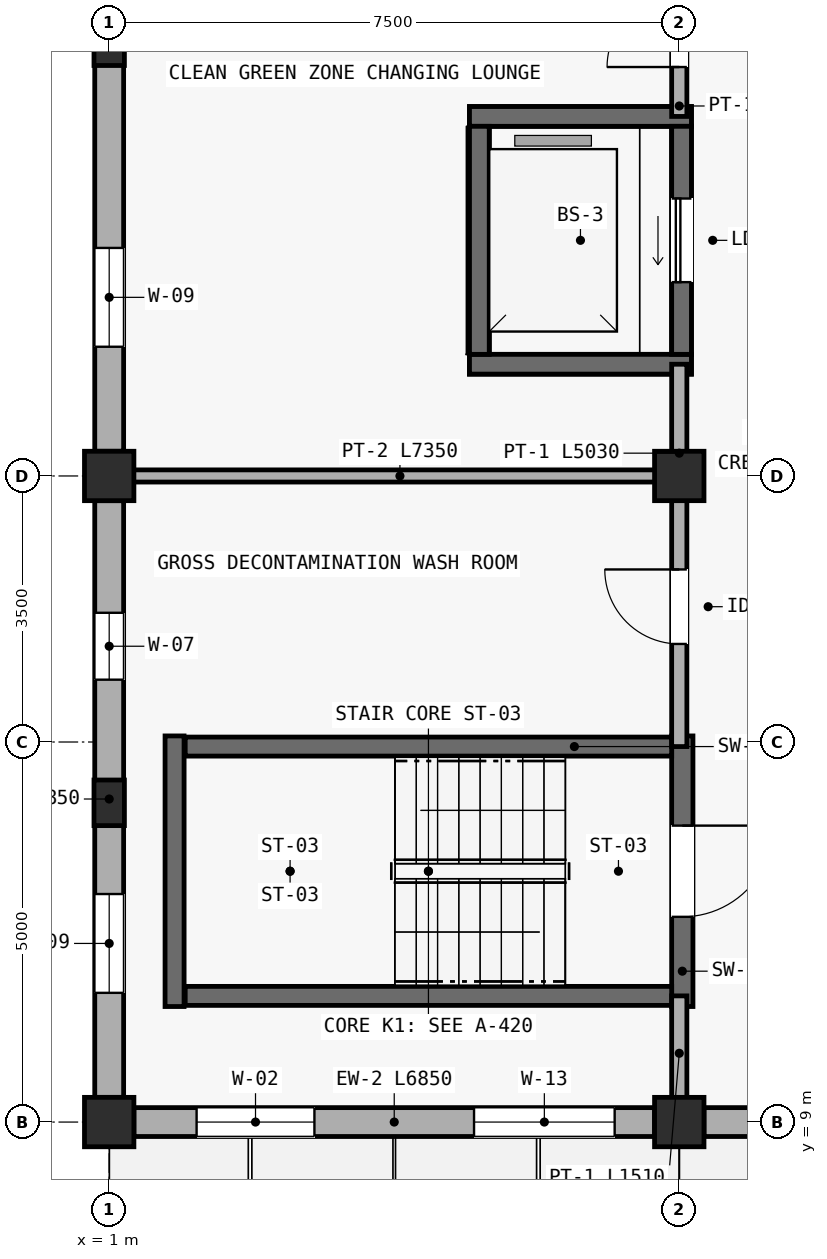
"""IFC4 building model, lengths in metres.
Left out: names, types, materials, properties, quantities, classifications, styles, units other than length and angle.
Written with IfcOpenShell. Run it as: python <this file> out.ifc"""

import sys

from ifc_helpers import new_model, si_unit, direction, frame, frame_2d, origin, origin_2d, place, context, subcontext, project, spatial, rectangle, extrude, element, fill, save


model = new_model("IFC4")
c1 = context("Model", 3, precision=1e-05, world=origin(), true_north=direction((0.0, 1.0)))
c2 = subcontext(c1, "Body", "Model", "MODEL_VIEW")
j1 = project(units=[si_unit("LENGTHUNIT", "METRE"), si_unit("PLANEANGLEUNIT", "RADIAN")], contexts=[c1])
p1 = place(None, origin())
s1 = spatial("IfcSite", under=j1, at=p1, CompositionType="ELEMENT")
p2 = place(p1, origin())
s2 = spatial("IfcBuilding", under=s1, at=p2, CompositionType="ELEMENT")
p3 = place(p2, origin())
s3 = spatial("IfcBuildingStorey", under=s2, at=p3, CompositionType="ELEMENT", Elevation=0.0)
for number, where, z_axis, x_axis in (
    (1, (1.0, 9.0, 0.0), (0.0, 0.0, 1.0), (1.0, 0.0, 0.0)),
    (2, (1.0, 17.5, 0.0), (0.0, 0.0, 1.0), (1.0, 0.0, 0.0)),
    (3, (8.5, 9.0, 0.0), (0.0, 0.0, 1.0), (1.0, 0.0, 0.0)),
    (4, (8.5, 17.5, 0.0), (0.0, 0.0, 1.0), (1.0, 0.0, 0.0)),
):
    element("IfcColumn", number, at=place(p3, frame(where, z_axis=z_axis, x_axis=x_axis)), inside=s3, PredefinedType="COLUMN", context=c2, shape_type="SweptSolid", body=[
        extrude(rectangle(XDim=0.65, YDim=0.65, at=origin_2d()), origin(), (0.0, 0.0, 1.0), 5.85),
    ])
for number, where, z_axis, x_axis in (
    (5, (1.0, 13.2, 0.0), (0.0, 0.0, 1.0), (1.0, 0.0, 0.0)),
    (6, (1.0, 23.2, 0.0), (0.0, 0.0, 1.0), (1.0, 0.0, 0.0)),
):
    element("IfcColumn", number, at=place(p3, frame(where, z_axis=z_axis, x_axis=x_axis)), inside=s3, PredefinedType="PILASTER", context=c2, shape_type="SweptSolid", body=[
        extrude(rectangle(XDim=0.4, YDim=0.6, at=origin_2d()), origin(), (0.0, 0.0, 1.0), 5.85),
    ])
p4 = place(p3, frame((1.325, 9.0, 0.0), z_axis=(0.0, 0.0, 1.0), x_axis=(1.0, 0.0, 0.0)))
e7 = element("IfcWall", 7, at=p4, inside=s3, PredefinedType="STANDARD", context=c2, shape_type="SweptSolid", body=[
    extrude(rectangle(XDim=6.85, YDim=0.38, at=frame_2d((3.425, 0.0))), origin(), (0.0, 0.0, 1.0), 5.05),
])
p5 = place(p4, frame((0.825, 0.0, 0.75)))
e8 = element("IfcOpeningElement", 8, at=p5, cuts=e7, PredefinedType="OPENING", context=c2, shape_type="SweptSolid", body=[
    extrude(rectangle(XDim=1.55, YDim=1.55, at=frame_2d((0.775, 0.775))), frame((0.0, 0.2, 0.0), z_axis=(0.0, -1.0, 0.0), x_axis=(1.0, 0.0, 0.0)), (0.0, 0.0, 1.0), 0.4),
])
p6 = place(p4, frame((4.475, 0.0, 0.75)))
e9 = element("IfcOpeningElement", 9, at=p6, cuts=e7, PredefinedType="OPENING", context=c2, shape_type="SweptSolid", body=[
    extrude(rectangle(XDim=1.85, YDim=1.3, at=frame_2d((0.925, 0.65))), frame((0.0, 0.2, 0.0), z_axis=(0.0, -1.0, 0.0), x_axis=(1.0, 0.0, 0.0)), (0.0, 0.0, 1.0), 0.4),
])
p7 = place(p3, frame((8.825, 9.0, 0.0), z_axis=(0.0, 0.0, 1.0), x_axis=(1.0, 0.0, 0.0)))
e10 = element("IfcWall", 10, at=p7, inside=s3, PredefinedType="STANDARD", context=c2, shape_type="SweptSolid", body=[
    extrude(rectangle(XDim=3.35, YDim=0.38, at=frame_2d((1.675, 0.0))), origin(), (0.0, 0.0, 1.0), 5.05),
])
p8 = place(p7, frame((0.625, 0.0, 0.0)))
e11 = element("IfcOpeningElement", 11, at=p8, cuts=e10, PredefinedType="OPENING", context=c2, shape_type="SweptSolid", body=[
    extrude(rectangle(XDim=1.95, YDim=2.3, at=frame_2d((0.975, 1.15))), frame((0.0, 0.2, 0.0), z_axis=(0.0, -1.0, 0.0), x_axis=(1.0, 0.0, 0.0)), (0.0, 0.0, 1.0), 0.4),
])
p9 = place(p3, frame((1.0, 17.175, 0.0), z_axis=(0.0, 0.0, 1.0), x_axis=(0.0, -1.0, 0.0)))
e12 = element("IfcWall", 12, at=p9, inside=s3, PredefinedType="STANDARD", context=c2, shape_type="SweptSolid", body=[
    extrude(rectangle(XDim=7.85, YDim=0.38, at=frame_2d((3.925, 0.0))), origin(), (0.0, 0.0, 1.0), 5.05),
])
p10 = place(p9, frame((1.475, 0.0, 0.7)))
e13 = element("IfcOpeningElement", 13, at=p10, cuts=e12, PredefinedType="OPENING", context=c2, shape_type="SweptSolid", body=[
    extrude(rectangle(XDim=0.88, YDim=1.5, at=frame_2d((0.44, 0.75))), frame((0.0, 0.2, 0.0), z_axis=(0.0, -1.0, 0.0), x_axis=(1.0, 0.0, 0.0)), (0.0, 0.0, 1.0), 0.4),
])
p11 = place(p9, frame((5.175, 0.0, 0.7)))
e14 = element("IfcOpeningElement", 14, at=p11, cuts=e12, PredefinedType="OPENING", context=c2, shape_type="SweptSolid", body=[
    extrude(rectangle(XDim=1.3, YDim=1.4, at=frame_2d((0.65, 0.7))), frame((0.0, 0.2, 0.0), z_axis=(0.0, -1.0, 0.0), x_axis=(1.0, 0.0, 0.0)), (0.0, 0.0, 1.0), 0.4),
])
p12 = place(p3, frame((1.0, 28.675, 0.0), z_axis=(0.0, 0.0, 1.0), x_axis=(0.0, -1.0, 0.0)))
e15 = element("IfcWall", 15, at=p12, inside=s3, PredefinedType="STANDARD", context=c2, shape_type="SweptSolid", body=[
    extrude(rectangle(XDim=10.85, YDim=0.38, at=frame_2d((5.425, 0.0))), origin(), (0.0, 0.0, 1.0), 5.05),
])
p13 = place(p12, frame((1.475, 0.0, 0.7)))
e16 = element("IfcOpeningElement", 16, at=p13, cuts=e15, PredefinedType="OPENING", context=c2, shape_type="SweptSolid", body=[
    extrude(rectangle(XDim=0.88, YDim=1.5, at=frame_2d((0.44, 0.75))), frame((0.0, 0.2, 0.0), z_axis=(0.0, -1.0, 0.0), x_axis=(1.0, 0.0, 0.0)), (0.0, 0.0, 1.0), 0.4),
])
p14 = place(p12, frame((8.175, 0.0, 0.7)))
e17 = element("IfcOpeningElement", 17, at=p14, cuts=e15, PredefinedType="OPENING", context=c2, shape_type="SweptSolid", body=[
    extrude(rectangle(XDim=1.3, YDim=1.4, at=frame_2d((0.65, 0.7))), frame((0.0, 0.2, 0.0), z_axis=(0.0, -1.0, 0.0), x_axis=(1.0, 0.0, 0.0)), (0.0, 0.0, 1.0), 0.4),
])
p15 = place(p3, frame((8.54, 14.08, 0.0), z_axis=(0.0, 0.0, 1.0), x_axis=(0.0, -1.0, 0.0)))
e18 = element("IfcWall", 18, at=p15, inside=s3, PredefinedType="SHEAR", context=c2, shape_type="SweptSolid", body=[
    extrude(rectangle(XDim=3.56, YDim=0.28, at=frame_2d((1.78, 0.0))), origin(), (0.0, 0.0, 1.0), 5.6),
])
p16 = place(p15, frame((1.18, 0.0, 0.0)))
e19 = element("IfcOpeningElement", 19, at=p16, cuts=e18, PredefinedType="OPENING", context=c2, shape_type="SweptSolid", body=[
    extrude(rectangle(XDim=1.2, YDim=2.15, at=frame_2d((0.6, 1.075))), frame((0.0, 0.15, 0.0), z_axis=(0.0, -1.0, 0.0), x_axis=(1.0, 0.0, 0.0)), (0.0, 0.0, 1.0), 0.3),
])
p17 = place(p3, frame((1.86, 10.52, 0.0), z_axis=(0.0, 0.0, 1.0), x_axis=(0.0, 1.0, 0.0)))
e20 = element("IfcWall", 20, at=p17, inside=s3, PredefinedType="SHEAR", context=c2, shape_type="SweptSolid", body=[
    extrude(rectangle(XDim=3.56, YDim=0.25, at=frame_2d((1.78, 0.0))), origin(), (0.0, 0.0, 1.0), 5.6),
])
for number, where, z_axis, x_axis in (
    (21, (8.4, 13.94, 0.0), (0.0, 0.0, 1.0), (-1.0, 0.0, 0.0)),
    (22, (2.0, 10.66, 0.0), (0.0, 0.0, 1.0), (1.0, 0.0, 0.0)),
):
    element("IfcWall", number, at=place(p3, frame(where, z_axis=z_axis, x_axis=x_axis)), inside=s3, PredefinedType="SHEAR", context=c2, shape_type="SweptSolid", body=[
        extrude(rectangle(XDim=6.4, YDim=0.25, at=frame_2d((3.2, 0.0))), origin(), (0.0, 0.0, 1.0), 5.6),
    ])
for number, where, z_axis, x_axis in (
    (23, (5.74, 18.97, -1.15), (0.0, 0.0, 1.0), (1.0, 0.0, 0.0)),
    (24, (8.66, 22.23, -1.15), (0.0, 0.0, 1.0), (-1.0, 0.0, 0.0)),
):
    element("IfcWall", number, at=place(p3, frame(where, z_axis=z_axis, x_axis=x_axis)), inside=s3, PredefinedType="SHEAR", context=c2, shape_type="SweptSolid", body=[
        extrude(rectangle(XDim=2.92, YDim=0.26, at=frame_2d((1.46, 0.0))), origin(), (0.0, 0.0, 1.0), 1.15),
    ])
for number, where, z_axis, x_axis in (
    (25, (5.87, 22.1, -1.15), (0.0, 0.0, 1.0), (0.0, -1.0, 0.0)),
    (26, (8.53, 19.1, -1.15), (0.0, 0.0, 1.0), (0.0, 1.0, 0.0)),
):
    element("IfcWall", number, at=place(p3, frame(where, z_axis=z_axis, x_axis=x_axis)), inside=s3, PredefinedType="SHEAR", context=c2, shape_type="SweptSolid", body=[
        extrude(rectangle(XDim=3.0, YDim=0.26, at=frame_2d((1.5, 0.0))), origin(), (0.0, 0.0, 1.0), 1.15),
    ])
for number, where, z_axis, x_axis in (
    (27, (5.74, 18.97, 0.0), (0.0, 0.0, 1.0), (1.0, 0.0, 0.0)),
    (28, (8.66, 22.23, 0.0), (0.0, 0.0, 1.0), (-1.0, 0.0, 0.0)),
):
    element("IfcWall", number, at=place(p3, frame(where, z_axis=z_axis, x_axis=x_axis)), inside=s3, PredefinedType="SHEAR", context=c2, shape_type="SweptSolid", body=[
        extrude(rectangle(XDim=2.92, YDim=0.26, at=frame_2d((1.46, 0.0))), origin(), (0.0, 0.0, 1.0), 5.6),
    ])
p18 = place(p3, frame((5.87, 22.1, 0.0), z_axis=(0.0, 0.0, 1.0), x_axis=(0.0, -1.0, 0.0)))
e29 = element("IfcWall", 29, at=p18, inside=s3, PredefinedType="SHEAR", context=c2, shape_type="SweptSolid", body=[
    extrude(rectangle(XDim=3.0, YDim=0.26, at=frame_2d((1.5, 0.0))), origin(), (0.0, 0.0, 1.0), 5.6),
])
p19 = place(p3, frame((8.53, 19.1, 0.0), z_axis=(0.0, 0.0, 1.0), x_axis=(0.0, 1.0, 0.0)))
e30 = element("IfcWall", 30, at=p19, inside=s3, PredefinedType="SHEAR", context=c2, shape_type="SweptSolid", body=[
    extrude(rectangle(XDim=3.0, YDim=0.26, at=frame_2d((1.5, 0.0))), origin(), (0.0, 0.0, 1.0), 5.6),
])
p20 = place(p19, frame((0.95, 0.0, 0.0)))
e31 = element("IfcOpeningElement", 31, at=p20, cuts=e30, PredefinedType="OPENING", context=c2, shape_type="SweptSolid", body=[
    extrude(rectangle(XDim=1.1, YDim=2.15, at=frame_2d((0.55, 1.075))), frame((0.0, 0.14, 0.0), z_axis=(0.0, -1.0, 0.0), x_axis=(1.0, 0.0, 0.0)), (0.0, 0.0, 1.0), 0.28),
])
p21 = place(p3, frame((8.5, 9.15, 0.0), z_axis=(0.0, 0.0, 1.0), x_axis=(0.0, 1.0, 0.0)))
e32 = element("IfcWall", 32, at=p21, inside=s3, PredefinedType="PARTITIONING", context=c2, shape_type="SweptSolid", body=[
    extrude(rectangle(XDim=1.51, YDim=0.2, at=frame_2d((0.755, 0.0))), origin(), (0.0, 0.0, 1.0), 5.0),
])
p22 = place(p3, frame((8.5, 13.94, 0.0), z_axis=(0.0, 0.0, 1.0), x_axis=(0.0, 1.0, 0.0)))
e33 = element("IfcWall", 33, at=p22, inside=s3, PredefinedType="PARTITIONING", context=c2, shape_type="SweptSolid", body=[
    extrude(rectangle(XDim=5.03, YDim=0.2, at=frame_2d((2.515, 0.0))), origin(), (0.0, 0.0, 1.0), 5.0),
])
p23 = place(p22, frame((1.35, 0.0, 0.0)))
e34 = element("IfcOpeningElement", 34, at=p23, cuts=e33, PredefinedType="OPENING", context=c2, shape_type="SweptSolid", body=[
    extrude(rectangle(XDim=0.98, YDim=2.12, at=frame_2d((0.49, 1.06))), frame((0.0, 0.11, 0.0), z_axis=(0.0, -1.0, 0.0), x_axis=(1.0, 0.0, 0.0)), (0.0, 0.0, 1.0), 0.22),
])
p24 = place(p3, frame((8.5, 22.23, 0.0), z_axis=(0.0, 0.0, 1.0), x_axis=(0.0, 1.0, 0.0)))
e35 = element("IfcWall", 35, at=p24, inside=s3, PredefinedType="PARTITIONING", context=c2, shape_type="SweptSolid", body=[
    extrude(rectangle(XDim=2.23, YDim=0.2, at=frame_2d((1.115, 0.0))), origin(), (0.0, 0.0, 1.0), 5.0),
])
p25 = place(p24, frame((0.65, 0.0, 0.0)))
e36 = element("IfcOpeningElement", 36, at=p25, cuts=e35, PredefinedType="OPENING", context=c2, shape_type="SweptSolid", body=[
    extrude(rectangle(XDim=0.95, YDim=2.1, at=frame_2d((0.475, 1.05))), frame((0.0, 0.11, 0.0), z_axis=(0.0, -1.0, 0.0), x_axis=(1.0, 0.0, 0.0)), (0.0, 0.0, 1.0), 0.22),
])
p26 = place(p3, frame((1.15, 17.5, 0.0), z_axis=(0.0, 0.0, 1.0), x_axis=(1.0, 0.0, 0.0)))
e37 = element("IfcWall", 37, at=p26, inside=s3, PredefinedType="PARTITIONING", context=c2, shape_type="SweptSolid", body=[
    extrude(rectangle(XDim=7.35, YDim=0.16, at=frame_2d((3.675, 0.0))), origin(), (0.0, 0.0, 1.0), 5.0),
])
p27 = place(p5, origin())
e38 = element("IfcWindow", 38, at=p27, inside=s3, PartitioningType="DOUBLE_PANEL_VERTICAL", PredefinedType="WINDOW", context=c2, shape_type="SweptSolid", body=[
    extrude(rectangle(XDim=1.55, YDim=1.55, at=frame_2d((0.775, 0.775))), frame((0.0, 0.03, 0.0), z_axis=(0.0, -1.0, 0.0), x_axis=(1.0, 0.0, 0.0)), (0.0, 0.0, 1.0), 0.06),
])
fill(e8, e38)
p28 = place(p6, origin())
e39 = element("IfcWindow", 39, at=p28, inside=s3, PartitioningType="DOUBLE_PANEL_HORIZONTAL", PredefinedType="WINDOW", context=c2, shape_type="SweptSolid", body=[
    extrude(rectangle(XDim=1.85, YDim=1.3, at=frame_2d((0.925, 0.65))), frame((0.0, 0.03, 0.0), z_axis=(0.0, -1.0, 0.0), x_axis=(1.0, 0.0, 0.0)), (0.0, 0.0, 1.0), 0.06),
])
fill(e9, e39)
p29 = place(p10, origin())
e40 = element("IfcWindow", 40, at=p29, inside=s3, PartitioningType="SINGLE_PANEL", PredefinedType="WINDOW", context=c2, shape_type="SweptSolid", body=[
    extrude(rectangle(XDim=0.88, YDim=1.5, at=frame_2d((0.44, 0.75))), frame((0.0, 0.03, 0.0), z_axis=(0.0, -1.0, 0.0), x_axis=(1.0, 0.0, 0.0)), (0.0, 0.0, 1.0), 0.06),
])
fill(e13, e40)
p30 = place(p11, origin())
e41 = element("IfcWindow", 41, at=p30, inside=s3, PartitioningType="SINGLE_PANEL", PredefinedType="WINDOW", context=c2, shape_type="SweptSolid", body=[
    extrude(rectangle(XDim=1.3, YDim=1.4, at=frame_2d((0.65, 0.7))), frame((0.0, 0.03, 0.0), z_axis=(0.0, -1.0, 0.0), x_axis=(1.0, 0.0, 0.0)), (0.0, 0.0, 1.0), 0.06),
])
fill(e14, e41)
p31 = place(p14, origin())
e42 = element("IfcWindow", 42, at=p31, inside=s3, PartitioningType="SINGLE_PANEL", PredefinedType="WINDOW", context=c2, shape_type="SweptSolid", body=[
    extrude(rectangle(XDim=1.3, YDim=1.4, at=frame_2d((0.65, 0.7))), frame((0.0, 0.03, 0.0), z_axis=(0.0, -1.0, 0.0), x_axis=(1.0, 0.0, 0.0)), (0.0, 0.0, 1.0), 0.06),
])
fill(e17, e42)
p32 = place(p16, origin())
e43 = element("IfcDoor", 43, at=p32, inside=s3, OperationType="SINGLE_SWING_LEFT", PredefinedType="DOOR", context=c2, shape_type="SweptSolid", body=[
    extrude(rectangle(XDim=1.2, YDim=2.15, at=frame_2d((0.6, 1.075))), frame((0.0, 0.025, 0.0), z_axis=(0.0, -1.0, 0.0), x_axis=(1.0, 0.0, 0.0)), (0.0, 0.0, 1.0), 0.05),
])
fill(e19, e43)
p33 = place(p20, origin())
e44 = element("IfcDoor", 44, at=p33, inside=s3, OperationType="SLIDING_TO_LEFT", PredefinedType="DOOR", context=c2, shape_type="SweptSolid", body=[
    extrude(rectangle(XDim=1.1, YDim=2.15, at=frame_2d((0.55, 1.075))), frame((0.0, 0.025, 0.0), z_axis=(0.0, -1.0, 0.0), x_axis=(1.0, 0.0, 0.0)), (0.0, 0.0, 1.0), 0.05),
])
fill(e31, e44)
p34 = place(p23, origin())
e45 = element("IfcDoor", 45, at=p34, inside=s3, OperationType="SINGLE_SWING_RIGHT", PredefinedType="DOOR", context=c2, shape_type="SweptSolid", body=[
    extrude(rectangle(XDim=0.98, YDim=2.12, at=frame_2d((0.49, 1.06))), frame((0.0, 0.025, 0.0), z_axis=(0.0, -1.0, 0.0), x_axis=(1.0, 0.0, 0.0)), (0.0, 0.0, 1.0), 0.05),
])
fill(e34, e45)
p35 = place(p25, origin())
e46 = element("IfcDoor", 46, at=p35, inside=s3, OperationType="SINGLE_SWING_LEFT", PredefinedType="DOOR", context=c2, shape_type="SweptSolid", body=[
    extrude(rectangle(XDim=0.95, YDim=2.1, at=frame_2d((0.475, 1.05))), frame((0.0, 0.025, 0.0), z_axis=(0.0, -1.0, 0.0), x_axis=(1.0, 0.0, 0.0)), (0.0, 0.0, 1.0), 0.05),
])
fill(e36, e46)
save(model, sys.argv[1])
